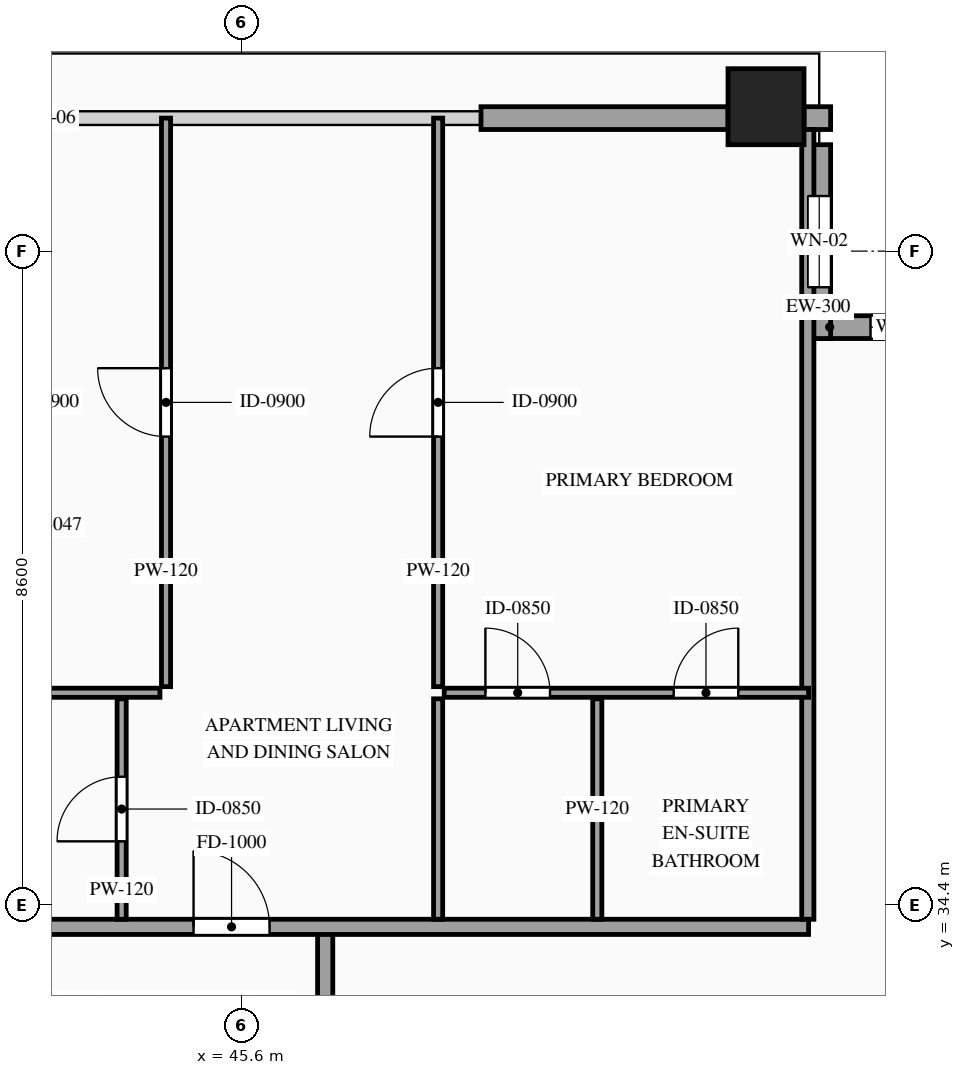
"""IFC4 building model, lengths in metres.
Left out: names, types, materials, properties, quantities, classifications, styles, units other than length and angle.
Written with IfcOpenShell. Run it as: python <this file> out.ifc"""

import sys

from ifc_helpers import new_model, si_unit, direction, frame, frame_2d, origin, origin_2d, place, context, subcontext, project, spatial, rectangle, hollow_rectangle, extrude, source, transform, mapped, element, fill, save


model = new_model("IFC4")
c1 = context("Model", 3, precision=1e-05, world=origin(), true_north=direction((0.0, 1.0)))
c2 = subcontext(c1, "Body", "Model", "MODEL_VIEW")
j1 = project(units=[si_unit("LENGTHUNIT", "METRE"), si_unit("PLANEANGLEUNIT", "RADIAN")], contexts=[c1])
p1 = place(None, origin())
s1 = spatial("IfcSite", under=j1, at=p1, CompositionType="ELEMENT")
p2 = place(p1, origin())
s2 = spatial("IfcBuilding", under=s1, at=p2, CompositionType="ELEMENT")
p3 = place(p2, frame((0.0, 0.0, 332.2)))
s3 = spatial("IfcBuildingStorey", under=s2, at=p3, CompositionType="ELEMENT", Elevation=332.2)
m1 = source(origin(), c2, "Body", "SweptSolid", [
    extrude(hollow_rectangle(XDim=1.0, YDim=1.0, WallThickness=0.048, at=origin_2d()), origin(), (0.0, 0.0, 1.0), 3.5),
])
p4 = place(p3, frame((52.5, 44.9, 0.0), z_axis=(0.0, 0.0, 1.0), x_axis=(1.0, 0.0, 0.0)))
e1 = element("IfcColumn", 1, at=p4, inside=s3, PredefinedType="COLUMN", context=c2, shape_type="MappedRepresentation", body=[
    mapped(m1, transform((0.0, 0.0, 0.0), scale=1.0)),
])
p5 = place(p3, frame((55.6, 42.0, 0.0), z_axis=(0.0, 0.0, 1.0), x_axis=(-1.0, 0.0, 0.0)))
e2 = element("IfcWall", 2, at=p5, inside=s3, PredefinedType="SOLIDWALL", context=c2, shape_type="SweptSolid", body=[
    extrude(rectangle(XDim=2.55, YDim=0.3, at=frame_2d((1.275, 0.0))), origin(), (0.0, 0.0, 1.0), 3.28),
])
p6 = place(p5, frame((0.825, 0.0, 0.85)))
e3 = element("IfcOpeningElement", 3, at=p6, cuts=e2, PredefinedType="OPENING", context=c2, shape_type="SweptSolid", body=[
    extrude(rectangle(XDim=0.9, YDim=1.5, at=frame_2d((0.45, 0.75))), frame((0.0, 0.165, 0.0), z_axis=(0.0, -1.0, 0.0), x_axis=(1.0, 0.0, 0.0)), (0.0, 0.0, 1.0), 0.33),
])
p7 = place(p3, frame((53.2, 41.85, 0.0), z_axis=(0.0, 0.0, 1.0), x_axis=(0.0, 1.0, 0.0)))
e4 = element("IfcWall", 4, at=p7, inside=s3, PredefinedType="SOLIDWALL", context=c2, shape_type="SweptSolid", body=[
    extrude(rectangle(XDim=2.55, YDim=0.3, at=frame_2d((1.275, 0.0))), origin(), (0.0, 0.0, 1.0), 3.28),
])
p8 = place(p7, frame((0.675, 0.0, 0.85)))
e5 = element("IfcOpeningElement", 5, at=p8, cuts=e4, PredefinedType="OPENING", context=c2, shape_type="SweptSolid", body=[
    extrude(rectangle(XDim=1.2, YDim=2.1, at=frame_2d((0.6, 1.05))), frame((0.0, 0.165, 0.0), z_axis=(0.0, -1.0, 0.0), x_axis=(1.0, 0.0, 0.0)), (0.0, 0.0, 1.0), 0.33),
])
m2 = source(origin(), c2, "Body", "SweptSolid", [
    extrude(rectangle(XDim=0.35, YDim=0.3, at=frame_2d((0.175, 0.0))), origin(), (0.0, 0.0, 1.0), 3.28),
])
p9 = place(p3, frame((53.0, 44.75, 0.0), z_axis=(0.0, 0.0, 1.0), x_axis=(1.0, 0.0, 0.0)))
e6 = element("IfcWall", 6, at=p9, inside=s3, PredefinedType="SOLIDWALL", context=c2, shape_type="MappedRepresentation", body=[
    mapped(m2, transform((0.0, 0.0, 0.0), scale=1.0)),
])
m3 = source(origin(), c2, "Body", "SweptSolid", [
    extrude(rectangle(XDim=3.25, YDim=0.3, at=frame_2d((1.625, 0.0))), origin(), (0.0, 0.0, 1.0), 2.885),
])
p10 = place(p3, frame((48.75, 44.75, 0.0), z_axis=(0.0, 0.0, 1.0), x_axis=(1.0, 0.0, 0.0)))
e7 = element("IfcWall", 7, at=p10, inside=s3, PredefinedType="SOLIDWALL", context=c2, shape_type="MappedRepresentation", body=[
    mapped(m3, transform((0.0, 0.0, 0.0), scale=1.0)),
])
m4 = source(origin(), c2, "Body", "SweptSolid", [
    extrude(rectangle(XDim=1.7, YDim=0.2, at=frame_2d((0.85, 0.0))), origin(), (0.0, 0.0, 1.0), 3.28),
])
p11 = place(p3, frame((46.7, 32.35, 0.0), z_axis=(0.0, 0.0, 1.0), x_axis=(0.0, 1.0, 0.0)))
e8 = element("IfcWall", 8, at=p11, inside=s3, PredefinedType="PARTITIONING", context=c2, shape_type="MappedRepresentation", body=[
    mapped(m4, transform((0.0, 0.0, 0.0), scale=1.0)),
])
p12 = place(p3, frame((37.08, 34.11, 0.0), z_axis=(0.0, 0.0, 1.0), x_axis=(1.0, 0.0, 0.0)))
e9 = element("IfcWall", 9, at=p12, inside=s3, PredefinedType="PARTITIONING", context=c2, shape_type="SweptSolid", body=[
    extrude(rectangle(XDim=15.98, YDim=0.2, at=frame_2d((7.99, 0.0))), origin(), (0.0, 0.0, 1.0), 3.28),
])
p13 = place(p12, frame((7.888, 0.0, 0.0)))
e10 = element("IfcOpeningElement", 10, at=p13, cuts=e9, PredefinedType="OPENING", context=c2, shape_type="SweptSolid", body=[
    extrude(rectangle(XDim=1.0, YDim=2.2, at=frame_2d((0.5, 1.1))), frame((0.0, 0.115, 0.0), z_axis=(0.0, -1.0, 0.0), x_axis=(1.0, 0.0, 0.0)), (0.0, 0.0, 1.0), 0.23),
])
m5 = source(origin(), c2, "Body", "SweptSolid", [
    extrude(rectangle(XDim=10.39, YDim=0.16, at=frame_2d((5.195, 0.0))), origin(), (0.0, 0.0, 1.0), 3.28),
])
p14 = place(p3, frame((53.05, 34.21, 0.0), z_axis=(0.0, 0.0, 1.0), x_axis=(0.0, 1.0, 0.0)))
e11 = element("IfcWall", 11, at=p14, inside=s3, PredefinedType="PARTITIONING", context=c2, shape_type="MappedRepresentation", body=[
    mapped(m5, transform((0.0, 0.0, 0.0), scale=1.0)),
])
p15 = place(p3, frame((44.022, 34.21, 0.0), z_axis=(0.0, 0.0, 1.0), x_axis=(0.0, 1.0, 0.0)))
e12 = element("IfcWall", 12, at=p15, inside=s3, PredefinedType="PARTITIONING", context=c2, shape_type="SweptSolid", body=[
    extrude(rectangle(XDim=2.9, YDim=0.12, at=frame_2d((1.45, 0.0))), origin(), (0.0, 0.0, 1.0), 3.28),
])
p16 = place(p15, frame((1.025, 0.0, 0.0)))
e13 = element("IfcOpeningElement", 13, at=p16, cuts=e12, PredefinedType="OPENING", context=c2, shape_type="SweptSolid", body=[
    extrude(rectangle(XDim=0.85, YDim=2.1, at=frame_2d((0.425, 1.05))), frame((0.0, 0.075, 0.0), z_axis=(0.0, -1.0, 0.0), x_axis=(1.0, 0.0, 0.0)), (0.0, 0.0, 1.0), 0.15),
])
m6 = source(origin(), c2, "Body", "SweptSolid", [
    extrude(rectangle(XDim=2.9, YDim=0.12, at=frame_2d((1.45, 0.0))), origin(), (0.0, 0.0, 1.0), 2.825),
])
p17 = place(p3, frame((50.28, 34.21, 0.0), z_axis=(0.0, 0.0, 1.0), x_axis=(0.0, 1.0, 0.0)))
e14 = element("IfcWall", 14, at=p17, inside=s3, PredefinedType="PARTITIONING", context=c2, shape_type="MappedRepresentation", body=[
    mapped(m6, transform((0.0, 0.0, 0.0), scale=1.0)),
])
m7 = source(origin(), c2, "Body", "SweptSolid", [
    extrude(rectangle(XDim=2.9, YDim=0.12, at=frame_2d((1.45, 0.0))), origin(), (0.0, 0.0, 1.0), 3.28),
])
p18 = place(p3, frame((48.186, 34.21, 0.0), z_axis=(0.0, 0.0, 1.0), x_axis=(0.0, 1.0, 0.0)))
e15 = element("IfcWall", 15, at=p18, inside=s3, PredefinedType="PARTITIONING", context=c2, shape_type="MappedRepresentation", body=[
    mapped(m7, transform((0.0, 0.0, 0.0), scale=1.0)),
])
p19 = place(p3, frame((48.266, 37.19, 0.0), z_axis=(0.0, 0.0, 1.0), x_axis=(1.0, 0.0, 0.0)))
e16 = element("IfcWall", 16, at=p19, inside=s3, PredefinedType="PARTITIONING", context=c2, shape_type="SweptSolid", body=[
    extrude(rectangle(XDim=4.794, YDim=0.12, at=frame_2d((2.397, 0.0))), origin(), (0.0, 0.0, 1.0), 3.28),
])
p20 = place(p19, frame((3.019, 0.0, 0.0)))
e17 = element("IfcOpeningElement", 17, at=p20, cuts=e16, PredefinedType="OPENING", context=c2, shape_type="SweptSolid", body=[
    extrude(rectangle(XDim=0.85, YDim=2.1, at=frame_2d((0.425, 1.05))), frame((0.0, 0.075, 0.0), z_axis=(0.0, -1.0, 0.0), x_axis=(1.0, 0.0, 0.0)), (0.0, 0.0, 1.0), 0.15),
])
p21 = place(p19, frame((0.542, 0.0, 0.0)))
e18 = element("IfcOpeningElement", 18, at=p21, cuts=e16, PredefinedType="OPENING", context=c2, shape_type="SweptSolid", body=[
    extrude(rectangle(XDim=0.85, YDim=2.1, at=frame_2d((0.425, 1.05))), frame((0.0, 0.075, 0.0), z_axis=(0.0, -1.0, 0.0), x_axis=(1.0, 0.0, 0.0)), (0.0, 0.0, 1.0), 0.15),
])
p22 = place(p3, frame((48.186, 37.27, 0.0), z_axis=(0.0, 0.0, 1.0), x_axis=(0.0, 1.0, 0.0)))
e19 = element("IfcWall", 19, at=p22, inside=s3, PredefinedType="PARTITIONING", context=c2, shape_type="SweptSolid", body=[
    extrude(rectangle(XDim=7.48, YDim=0.12, at=frame_2d((3.74, 0.0))), origin(), (0.0, 0.0, 1.0), 3.28),
])
p23 = place(p22, frame((3.29, 0.0, 0.0)))
e20 = element("IfcOpeningElement", 20, at=p23, cuts=e19, PredefinedType="OPENING", context=c2, shape_type="SweptSolid", body=[
    extrude(rectangle(XDim=0.9, YDim=2.15, at=frame_2d((0.45, 1.075))), frame((0.0, 0.075, 0.0), z_axis=(0.0, -1.0, 0.0), x_axis=(1.0, 0.0, 0.0)), (0.0, 0.0, 1.0), 0.15),
])
m8 = source(origin(), c2, "Body", "SweptSolid", [
    extrude(rectangle(XDim=2.812, YDim=0.12, at=frame_2d((1.406, 0.0))), origin(), (0.0, 0.0, 1.0), 3.28),
])
p24 = place(p3, frame((41.714, 37.19, 0.0), z_axis=(0.0, 0.0, 1.0), x_axis=(1.0, 0.0, 0.0)))
e21 = element("IfcWall", 21, at=p24, inside=s3, PredefinedType="PARTITIONING", context=c2, shape_type="MappedRepresentation", body=[
    mapped(m8, transform((0.0, 0.0, 0.0), scale=1.0)),
])
p25 = place(p3, frame((44.606, 37.27, 0.0), z_axis=(0.0, 0.0, 1.0), x_axis=(0.0, 1.0, 0.0)))
e22 = element("IfcWall", 22, at=p25, inside=s3, PredefinedType="PARTITIONING", context=c2, shape_type="SweptSolid", body=[
    extrude(rectangle(XDim=7.48, YDim=0.12, at=frame_2d((3.74, 0.0))), origin(), (0.0, 0.0, 1.0), 3.28),
])
p26 = place(p25, frame((3.29, 0.0, 0.0)))
e23 = element("IfcOpeningElement", 23, at=p26, cuts=e22, PredefinedType="OPENING", context=c2, shape_type="SweptSolid", body=[
    extrude(rectangle(XDim=0.9, YDim=2.15, at=frame_2d((0.45, 1.075))), frame((0.0, 0.075, 0.0), z_axis=(0.0, -1.0, 0.0), x_axis=(1.0, 0.0, 0.0)), (0.0, 0.0, 1.0), 0.15),
])
m9 = source(origin(), c2, "Body", "SweptSolid", [
    extrude(rectangle(XDim=0.9, YDim=1.5, at=frame_2d((0.45, 0.75))), frame((0.0, 0.03, 0.0), z_axis=(0.0, -1.0, 0.0), x_axis=(1.0, 0.0, 0.0)), (0.0, 0.0, 1.0), 0.06),
])
p27 = place(p6, origin())
e24 = element("IfcWindow", 24, at=p27, inside=s3, PartitioningType="SINGLE_PANEL", PredefinedType="WINDOW", context=c2, shape_type="MappedRepresentation", body=[
    mapped(m9, transform((0.0, 0.0, 0.0), scale=1.0)),
])
fill(e3, e24)
m10 = source(origin(), c2, "Body", "SweptSolid", [
    extrude(rectangle(XDim=1.2, YDim=2.1, at=frame_2d((0.6, 1.05))), frame((0.0, 0.03, 0.0), z_axis=(0.0, -1.0, 0.0), x_axis=(1.0, 0.0, 0.0)), (0.0, 0.0, 1.0), 0.06),
])
p28 = place(p8, origin())
e25 = element("IfcWindow", 25, at=p28, inside=s3, PartitioningType="SINGLE_PANEL", PredefinedType="WINDOW", context=c2, shape_type="MappedRepresentation", body=[
    mapped(m10, transform((0.0, 0.0, 0.0), scale=1.0)),
])
fill(e5, e25)
m11 = source(origin(), c2, "Body", "SweptSolid", [
    extrude(rectangle(XDim=1.0, YDim=2.2, at=frame_2d((0.5, 1.1))), frame((0.0, 0.025, 0.0), z_axis=(0.0, -1.0, 0.0), x_axis=(1.0, 0.0, 0.0)), (0.0, 0.0, 1.0), 0.05),
])
p29 = place(p13, origin())
e26 = element("IfcDoor", 26, at=p29, inside=s3, OperationType="SINGLE_SWING_LEFT", PredefinedType="DOOR", context=c2, shape_type="MappedRepresentation", body=[
    mapped(m11, transform((0.0, 0.0, 0.0), scale=1.0)),
])
fill(e10, e26)
m12 = source(origin(), c2, "Body", "SweptSolid", [
    extrude(rectangle(XDim=0.85, YDim=2.1, at=frame_2d((0.425, 1.05))), frame((0.0, 0.025, 0.0), z_axis=(0.0, -1.0, 0.0), x_axis=(1.0, 0.0, 0.0)), (0.0, 0.0, 1.0), 0.05),
])
p30 = place(p16, origin())
e27 = element("IfcDoor", 27, at=p30, inside=s3, OperationType="SINGLE_SWING_LEFT", PredefinedType="DOOR", context=c2, shape_type="MappedRepresentation", body=[
    mapped(m12, transform((0.0, 0.0, 0.0), scale=1.0)),
])
fill(e13, e27)
p31 = place(p20, origin())
e28 = element("IfcDoor", 28, at=p31, inside=s3, OperationType="SINGLE_SWING_RIGHT", PredefinedType="DOOR", context=c2, shape_type="MappedRepresentation", body=[
    mapped(m12, transform((0.0, 0.0, 0.0), scale=1.0)),
])
fill(e17, e28)
p32 = place(p21, origin())
e29 = element("IfcDoor", 29, at=p32, inside=s3, OperationType="SINGLE_SWING_LEFT", PredefinedType="DOOR", context=c2, shape_type="MappedRepresentation", body=[
    mapped(m12, transform((0.0, 0.0, 0.0), scale=1.0)),
])
fill(e18, e29)
m13 = source(origin(), c2, "Body", "SweptSolid", [
    extrude(rectangle(XDim=0.9, YDim=2.15, at=frame_2d((0.45, 1.075))), frame((0.0, 0.025, 0.0), z_axis=(0.0, -1.0, 0.0), x_axis=(1.0, 0.0, 0.0)), (0.0, 0.0, 1.0), 0.05),
])
p33 = place(p23, origin())
e30 = element("IfcDoor", 30, at=p33, inside=s3, OperationType="SINGLE_SWING_LEFT", PredefinedType="DOOR", context=c2, shape_type="MappedRepresentation", body=[
    mapped(m13, transform((0.0, 0.0, 0.0), scale=1.0)),
])
fill(e20, e30)
p34 = place(p26, origin())
e31 = element("IfcDoor", 31, at=p34, inside=s3, OperationType="SINGLE_SWING_RIGHT", PredefinedType="DOOR", context=c2, shape_type="MappedRepresentation", body=[
    mapped(m13, transform((0.0, 0.0, 0.0), scale=1.0)),
])
fill(e23, e31)
save(model, sys.argv[1])
